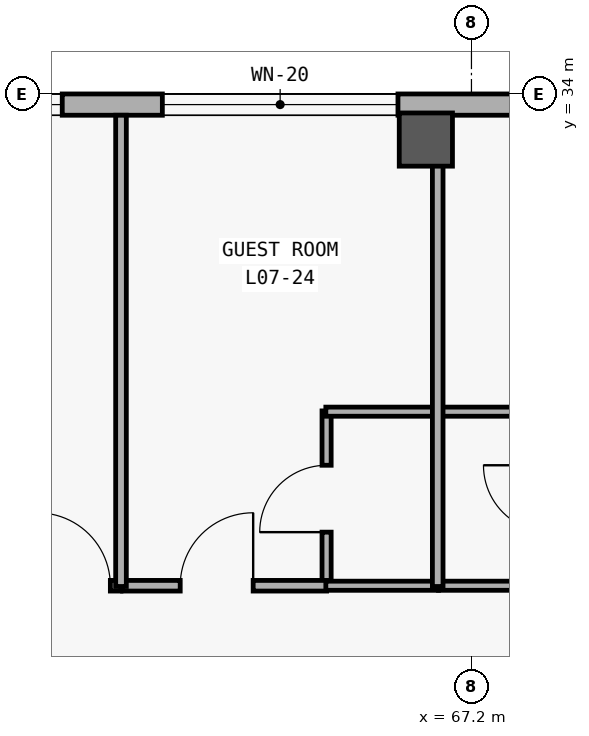
"""IFC4 building model, lengths in metres.
Left out: names, types, materials, properties, quantities, classifications, styles, units other than length and angle.
Written with IfcOpenShell. Run it as: python <this file> out.ifc"""

import sys

from ifc_helpers import new_model, si_unit, direction, frame, frame_2d, origin, origin_2d, place, context, subcontext, project, spatial, rectangle, extrude, element, fill, save


model = new_model("IFC4")
c1 = context("Model", 3, precision=1e-05, world=origin(), true_north=direction((0.0, 1.0)))
c2 = subcontext(c1, "Body", "Model", "MODEL_VIEW")
j1 = project(units=[si_unit("LENGTHUNIT", "METRE"), si_unit("PLANEANGLEUNIT", "RADIAN")], contexts=[c1])
p1 = place(None, origin())
s1 = spatial("IfcSite", under=j1, at=p1, CompositionType="ELEMENT")
p2 = place(p1, origin())
s2 = spatial("IfcBuilding", under=s1, at=p2, CompositionType="ELEMENT")
p3 = place(p2, frame((0.0, 0.0, 30.0)))
s3 = spatial("IfcBuildingStorey", under=s2, at=p3, CompositionType="ELEMENT", Elevation=30.0)
p4 = place(p3, frame((66.6, 33.4, 0.0), z_axis=(0.0, 0.0, 1.0), x_axis=(1.0, 0.0, 0.0)))
e1 = element("IfcColumn", 1, at=p4, inside=s3, PredefinedType="COLUMN", context=c2, shape_type="SweptSolid", body=[
    extrude(rectangle(XDim=0.7, YDim=0.7, at=origin_2d()), origin(), (0.0, 0.0, 1.0), 3.6),
])
p5 = place(p3, frame((8.68, 33.86, 0.0), z_axis=(0.0, 0.0, 1.0), x_axis=(1.0, 0.0, 0.0)))
e2 = element("IfcWall", 2, at=p5, inside=s3, PredefinedType="SOLIDWALL", context=c2, shape_type="SweptSolid", body=[
    extrude(rectangle(XDim=66.64, YDim=0.28, at=frame_2d((33.32, 0.0))), origin(), (0.0, 0.0, 1.0), 3.34),
])
p6 = place(p5, frame((5.195, 0.0, 0.85)))
e3 = element("IfcOpeningElement", 3, at=p6, cuts=e2, PredefinedType="OPENING", context=c2, shape_type="SweptSolid", body=[
    extrude(rectangle(XDim=2.0, YDim=1.65, at=frame_2d((1.0, 0.825))), frame((0.0, 0.15, 0.0), z_axis=(0.0, -1.0, 0.0), x_axis=(1.0, 0.0, 0.0)), (0.0, 0.0, 1.0), 0.3),
])
p7 = place(p5, frame((13.209, 0.0, 0.85)))
e4 = element("IfcOpeningElement", 4, at=p7, cuts=e2, PredefinedType="OPENING", context=c2, shape_type="SweptSolid", body=[
    extrude(rectangle(XDim=2.25, YDim=1.75, at=frame_2d((1.125, 0.875))), frame((0.0, 0.15, 0.0), z_axis=(0.0, -1.0, 0.0), x_axis=(1.0, 0.0, 0.0)), (0.0, 0.0, 1.0), 0.3),
])
p8 = place(p5, frame((17.226, 0.0, 0.85)))
e5 = element("IfcOpeningElement", 5, at=p8, cuts=e2, PredefinedType="OPENING", context=c2, shape_type="SweptSolid", body=[
    extrude(rectangle(XDim=2.55, YDim=1.8, at=frame_2d((1.275, 0.9))), frame((0.0, 0.15, 0.0), z_axis=(0.0, -1.0, 0.0), x_axis=(1.0, 0.0, 0.0)), (0.0, 0.0, 1.0), 0.3),
])
p9 = place(p5, frame((21.242, 0.0, 0.85)))
e6 = element("IfcOpeningElement", 6, at=p9, cuts=e2, PredefinedType="OPENING", context=c2, shape_type="SweptSolid", body=[
    extrude(rectangle(XDim=2.85, YDim=1.85, at=frame_2d((1.425, 0.925))), frame((0.0, 0.15, 0.0), z_axis=(0.0, -1.0, 0.0), x_axis=(1.0, 0.0, 0.0)), (0.0, 0.0, 1.0), 0.3),
])
p10 = place(p5, frame((25.234, 0.0, 0.85)))
e7 = element("IfcOpeningElement", 7, at=p10, cuts=e2, PredefinedType="OPENING", context=c2, shape_type="SweptSolid", body=[
    extrude(rectangle(XDim=3.2, YDim=1.95, at=frame_2d((1.6, 0.975))), frame((0.0, 0.15, 0.0), z_axis=(0.0, -1.0, 0.0), x_axis=(1.0, 0.0, 0.0)), (0.0, 0.0, 1.0), 0.3),
])
p11 = place(p5, frame((30.302, 0.0, 0.85)))
e8 = element("IfcOpeningElement", 8, at=p11, cuts=e2, PredefinedType="OPENING", context=c2, shape_type="SweptSolid", body=[
    extrude(rectangle(XDim=1.4, YDim=1.6, at=frame_2d((0.7, 0.8))), frame((0.0, 0.15, 0.0), z_axis=(0.0, -1.0, 0.0), x_axis=(1.0, 0.0, 0.0)), (0.0, 0.0, 1.0), 0.3),
])
p12 = place(p5, frame((34.369, 0.0, 0.85)))
e9 = element("IfcOpeningElement", 9, at=p12, cuts=e2, PredefinedType="OPENING", context=c2, shape_type="SweptSolid", body=[
    extrude(rectangle(XDim=1.6, YDim=1.6, at=frame_2d((0.8, 0.8))), frame((0.0, 0.15, 0.0), z_axis=(0.0, -1.0, 0.0), x_axis=(1.0, 0.0, 0.0)), (0.0, 0.0, 1.0), 0.3),
])
p13 = place(p5, frame((38.435, 0.0, 0.85)))
e10 = element("IfcOpeningElement", 10, at=p13, cuts=e2, PredefinedType="OPENING", context=c2, shape_type="SweptSolid", body=[
    extrude(rectangle(XDim=1.8, YDim=1.6, at=frame_2d((0.9, 0.8))), frame((0.0, 0.15, 0.0), z_axis=(0.0, -1.0, 0.0), x_axis=(1.0, 0.0, 0.0)), (0.0, 0.0, 1.0), 0.3),
])
p14 = place(p5, frame((42.502, 0.0, 0.85)))
e11 = element("IfcOpeningElement", 11, at=p14, cuts=e2, PredefinedType="OPENING", context=c2, shape_type="SweptSolid", body=[
    extrude(rectangle(XDim=2.0, YDim=1.65, at=frame_2d((1.0, 0.825))), frame((0.0, 0.15, 0.0), z_axis=(0.0, -1.0, 0.0), x_axis=(1.0, 0.0, 0.0)), (0.0, 0.0, 1.0), 0.3),
])
p15 = place(p5, frame((46.569, 0.0, 0.85)))
e12 = element("IfcOpeningElement", 12, at=p15, cuts=e2, PredefinedType="OPENING", context=c2, shape_type="SweptSolid", body=[
    extrude(rectangle(XDim=2.2, YDim=1.65, at=frame_2d((1.1, 0.825))), frame((0.0, 0.15, 0.0), z_axis=(0.0, -1.0, 0.0), x_axis=(1.0, 0.0, 0.0)), (0.0, 0.0, 1.0), 0.3),
])
p16 = place(p5, frame((50.536, 0.0, 0.85)))
e13 = element("IfcOpeningElement", 13, at=p16, cuts=e2, PredefinedType="OPENING", context=c2, shape_type="SweptSolid", body=[
    extrude(rectangle(XDim=2.6, YDim=2.2, at=frame_2d((1.3, 1.1))), frame((0.0, 0.15, 0.0), z_axis=(0.0, -1.0, 0.0), x_axis=(1.0, 0.0, 0.0)), (0.0, 0.0, 1.0), 0.3),
])
p17 = place(p5, frame((54.453, 0.0, 0.85)))
e14 = element("IfcOpeningElement", 14, at=p17, cuts=e2, PredefinedType="OPENING", context=c2, shape_type="SweptSolid", body=[
    extrude(rectangle(XDim=3.1, YDim=2.2, at=frame_2d((1.55, 1.1))), frame((0.0, 0.15, 0.0), z_axis=(0.0, -1.0, 0.0), x_axis=(1.0, 0.0, 0.0)), (0.0, 0.0, 1.0), 0.3),
])
p18 = place(p5, frame((59.545, 0.0, 0.85)))
e15 = element("IfcOpeningElement", 15, at=p18, cuts=e2, PredefinedType="OPENING", context=c2, shape_type="SweptSolid", body=[
    extrude(rectangle(XDim=1.25, YDim=1.45, at=frame_2d((0.625, 0.725))), frame((0.0, 0.15, 0.0), z_axis=(0.0, -1.0, 0.0), x_axis=(1.0, 0.0, 0.0)), (0.0, 0.0, 1.0), 0.3),
])
p19 = place(p5, frame((63.662, 0.0, 0.85)))
e16 = element("IfcOpeningElement", 16, at=p19, cuts=e2, PredefinedType="OPENING", context=c2, shape_type="SweptSolid", body=[
    extrude(rectangle(XDim=1.35, YDim=1.55, at=frame_2d((0.675, 0.775))), frame((0.0, 0.15, 0.0), z_axis=(0.0, -1.0, 0.0), x_axis=(1.0, 0.0, 0.0)), (0.0, 0.0, 1.0), 0.3),
])
p20 = place(p3, frame((65.294, 27.52, 0.0), z_axis=(0.0, 0.0, 1.0), x_axis=(0.0, 1.0, 0.0)))
e17 = element("IfcWall", 17, at=p20, inside=s3, PredefinedType="PARTITIONING", context=c2, shape_type="SweptSolid", body=[
    extrude(rectangle(XDim=2.31, YDim=0.12, at=frame_2d((1.155, 0.0))), origin(), (0.0, 0.0, 1.0), 2.48),
])
p21 = place(p20, frame((0.715, 0.0, 0.0)))
e18 = element("IfcOpeningElement", 18, at=p21, cuts=e17, PredefinedType="OPENING", context=c2, shape_type="SweptSolid", body=[
    extrude(rectangle(XDim=0.88, YDim=2.15, at=frame_2d((0.44, 1.075))), frame((0.0, 0.07, 0.0), z_axis=(0.0, -1.0, 0.0), x_axis=(1.0, 0.0, 0.0)), (0.0, 0.0, 1.0), 0.14),
])
p22 = place(p3, frame((59.904, 27.53, 0.0), z_axis=(0.0, 0.0, 1.0), x_axis=(1.0, 0.0, 0.0)))
e19 = element("IfcWall", 19, at=p22, inside=s3, PredefinedType="PARTITIONING", context=c2, shape_type="SweptSolid", body=[
    extrude(rectangle(XDim=2.685, YDim=0.14, at=frame_2d((1.343, 0.0))), origin(), (0.0, 0.0, 1.0), 2.48),
])
p23 = place(p22, frame((1.585, 0.0, 0.0)))
e20 = element("IfcOpeningElement", 20, at=p23, cuts=e19, PredefinedType="OPENING", context=c2, shape_type="SweptSolid", body=[
    extrude(rectangle(XDim=0.96, YDim=2.25, at=frame_2d((0.48, 1.125))), frame((0.0, 0.08, 0.0), z_axis=(0.0, -1.0, 0.0), x_axis=(1.0, 0.0, 0.0)), (0.0, 0.0, 1.0), 0.16),
])
p24 = place(p3, frame((62.609, 27.53, 0.0), z_axis=(0.0, 0.0, 1.0), x_axis=(1.0, 0.0, 0.0)))
e21 = element("IfcWall", 21, at=p24, inside=s3, PredefinedType="PARTITIONING", context=c2, shape_type="SweptSolid", body=[
    extrude(rectangle(XDim=2.685, YDim=0.14, at=frame_2d((1.343, 0.0))), origin(), (0.0, 0.0, 1.0), 2.48),
])
p25 = place(p24, frame((0.759, 0.0, 0.0)))
e22 = element("IfcOpeningElement", 22, at=p25, cuts=e21, PredefinedType="OPENING", context=c2, shape_type="SweptSolid", body=[
    extrude(rectangle(XDim=0.96, YDim=2.25, at=frame_2d((0.48, 1.125))), frame((0.0, 0.08, 0.0), z_axis=(0.0, -1.0, 0.0), x_axis=(1.0, 0.0, 0.0)), (0.0, 0.0, 1.0), 0.16),
])
for number, where, z_axis, x_axis in (
    (23, (65.284, 27.53, 0.0), (0.0, 0.0, 1.0), (1.0, 0.0, 0.0)),
    (24, (65.284, 29.82, 0.0), (0.0, 0.0, 1.0), (1.0, 0.0, 0.0)),
):
    element("IfcWall", number, at=place(p3, frame(where, z_axis=z_axis, x_axis=x_axis)), inside=s3, PredefinedType="PARTITIONING", context=c2, shape_type="SweptSolid", body=[
        extrude(rectangle(XDim=1.482, YDim=0.12, at=frame_2d((0.741, 0.0))), origin(), (0.0, 0.0, 1.0), 2.48),
    ])
for number, where, z_axis, x_axis in (
    (25, (66.766, 27.53, 0.0), (0.0, 0.0, 1.0), (1.0, 0.0, 0.0)),
    (26, (66.766, 29.82, 0.0), (0.0, 0.0, 1.0), (1.0, 0.0, 0.0)),
):
    element("IfcWall", number, at=place(p3, frame(where, z_axis=z_axis, x_axis=x_axis)), inside=s3, PredefinedType="PARTITIONING", context=c2, shape_type="SweptSolid", body=[
        extrude(rectangle(XDim=1.482, YDim=0.12, at=frame_2d((0.741, 0.0))), origin(), (0.0, 0.0, 1.0), 2.48),
    ])
for number, where, z_axis, x_axis in (
    (27, (62.589, 27.52, 0.0), (0.0, 0.0, 1.0), (0.0, 1.0, 0.0)),
    (28, (66.756, 27.52, 0.0), (0.0, 0.0, 1.0), (0.0, 1.0, 0.0)),
):
    element("IfcWall", number, at=place(p3, frame(where, z_axis=z_axis, x_axis=x_axis)), inside=s3, PredefinedType="PARTITIONING", context=c2, shape_type="SweptSolid", body=[
        extrude(rectangle(XDim=6.2, YDim=0.14, at=frame_2d((3.1, 0.0))), origin(), (0.0, 0.0, 1.0), 2.48),
    ])
p26 = place(p16, origin())
e29 = element("IfcWindow", 29, at=p26, inside=s3, PartitioningType="SINGLE_PANEL", PredefinedType="WINDOW", context=c2, shape_type="SweptSolid", body=[
    extrude(rectangle(XDim=2.6, YDim=2.2, at=frame_2d((1.3, 1.1))), frame((0.0, 0.03, 0.0), z_axis=(0.0, -1.0, 0.0), x_axis=(1.0, 0.0, 0.0)), (0.0, 0.0, 1.0), 0.06),
])
fill(e13, e29)
p27 = place(p17, origin())
e30 = element("IfcWindow", 30, at=p27, inside=s3, PartitioningType="SINGLE_PANEL", PredefinedType="WINDOW", context=c2, shape_type="SweptSolid", body=[
    extrude(rectangle(XDim=3.1, YDim=2.2, at=frame_2d((1.55, 1.1))), frame((0.0, 0.03, 0.0), z_axis=(0.0, -1.0, 0.0), x_axis=(1.0, 0.0, 0.0)), (0.0, 0.0, 1.0), 0.06),
])
fill(e14, e30)
p28 = place(p21, origin())
e31 = element("IfcDoor", 31, at=p28, inside=s3, OperationType="SINGLE_SWING_LEFT", PredefinedType="DOOR", context=c2, shape_type="SweptSolid", body=[
    extrude(rectangle(XDim=0.88, YDim=2.15, at=frame_2d((0.44, 1.075))), frame((0.0, 0.025, 0.0), z_axis=(0.0, -1.0, 0.0), x_axis=(1.0, 0.0, 0.0)), (0.0, 0.0, 1.0), 0.05),
])
fill(e18, e31)
p29 = place(p23, origin())
e32 = element("IfcDoor", 32, at=p29, inside=s3, OperationType="SINGLE_SWING_LEFT", PredefinedType="DOOR", context=c2, shape_type="SweptSolid", body=[
    extrude(rectangle(XDim=0.96, YDim=2.25, at=frame_2d((0.48, 1.125))), frame((0.0, 0.025, 0.0), z_axis=(0.0, -1.0, 0.0), x_axis=(1.0, 0.0, 0.0)), (0.0, 0.0, 1.0), 0.05),
])
fill(e20, e32)
p30 = place(p25, origin())
e33 = element("IfcDoor", 33, at=p30, inside=s3, OperationType="SINGLE_SWING_RIGHT", PredefinedType="DOOR", context=c2, shape_type="SweptSolid", body=[
    extrude(rectangle(XDim=0.96, YDim=2.25, at=frame_2d((0.48, 1.125))), frame((0.0, 0.025, 0.0), z_axis=(0.0, -1.0, 0.0), x_axis=(1.0, 0.0, 0.0)), (0.0, 0.0, 1.0), 0.05),
])
fill(e22, e33)
save(model, sys.argv[1])
